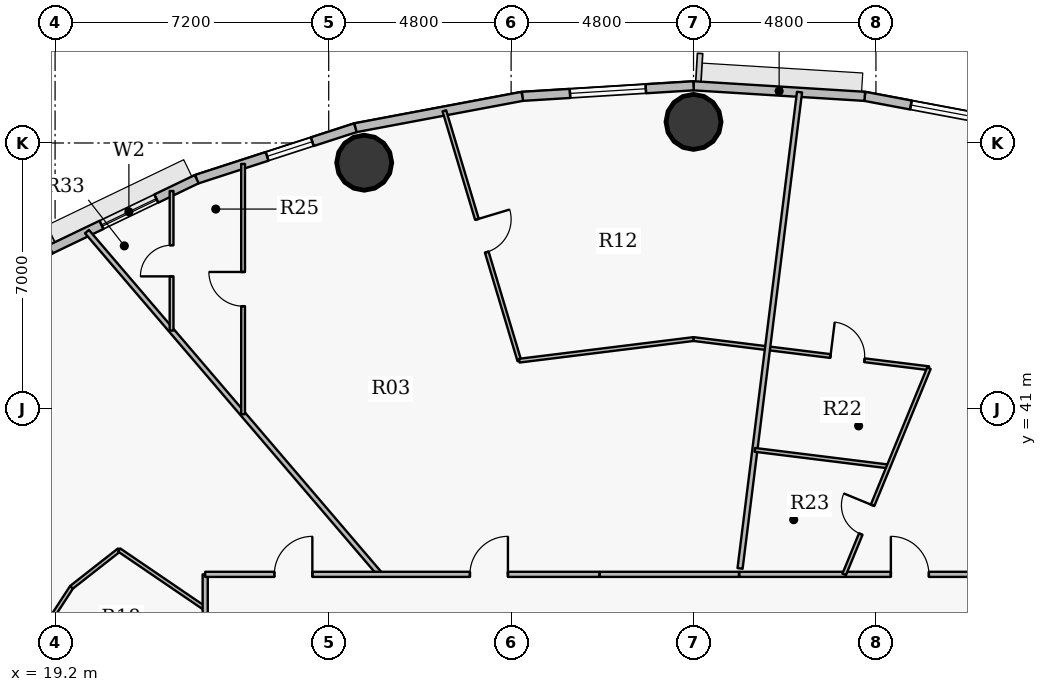
"""IFC4 building model, lengths in metres.
Left out: names, types, materials, properties, quantities, classifications, styles, units other than length and angle.
Written with IfcOpenShell. Run it as: python <this file> out.ifc"""

import sys

from ifc_helpers import new_model, si_unit, direction, frame, frame_2d, origin, origin_2d, place, context, subcontext, project, spatial, rectangle, hollow_circle, extrude, source, transform, mapped, element, fill, save


model = new_model("IFC4")
c1 = context("Model", 3, precision=1e-05, world=origin(), true_north=direction((0.0, 1.0)))
c2 = subcontext(c1, "Body", "Model", "MODEL_VIEW")
j1 = project(units=[si_unit("LENGTHUNIT", "METRE"), si_unit("PLANEANGLEUNIT", "RADIAN")], contexts=[c1])
p1 = place(None, origin())
s1 = spatial("IfcSite", under=j1, at=p1, CompositionType="ELEMENT")
p2 = place(p1, origin())
s2 = spatial("IfcBuilding", under=s1, at=p2, CompositionType="ELEMENT")
p3 = place(p2, frame((0.0, 0.0, 100.95)))
s3 = spatial("IfcBuildingStorey", under=s2, at=p3, CompositionType="ELEMENT", Elevation=100.95)
for number, where, z_axis, x_axis in (
    (1, (36.0, 48.555, 0.0), (0.0, 0.0, 1.0), (1.0, 0.0, 0.0)),
    (2, (27.334, 47.481, 0.0), (0.0, 0.0, 1.0), (1.0, 0.0, 0.0)),
):
    element("IfcColumn", number, at=place(p3, frame(where, z_axis=z_axis, x_axis=x_axis)), inside=s3, PredefinedType="COLUMN", context=c2, shape_type="SweptSolid", body=[
        extrude(hollow_circle(Radius=0.725, WallThickness=0.042, at=origin_2d()), origin(), (0.0, 0.0, 1.0), 3.75),
    ])
p4 = place(p3, frame((40.506, 49.227, 0.0), z_axis=(0.0, 0.0, 1.0), x_axis=(0.982789252177, -0.184730305596, 0.0)))
e3 = element("IfcWall", 3, at=p4, inside=s3, PredefinedType="SOLIDWALL", context=c2, shape_type="SweptSolid", body=[
    extrude(rectangle(XDim=4.471, YDim=0.24, at=frame_2d((2.235, 0.0))), origin(), (0.0, 0.0, 1.0), 3.5),
])
p5 = place(p4, frame((1.236, 0.0, 0.9)))
e4 = element("IfcOpeningElement", 4, at=p5, cuts=e3, PredefinedType="OPENING", context=c2, shape_type="SweptSolid", body=[
    extrude(rectangle(XDim=2.0, YDim=1.75, at=origin_2d()), frame((1.0, 0.13, 0.875), z_axis=(0.0, -1.0, 0.0), x_axis=(1.0, 0.0, 0.0)), (0.0, 0.0, 1.0), 0.26),
])
p6 = place(p3, frame((36.0, 49.505, 0.0), z_axis=(0.0, 0.0, 1.0), x_axis=(0.998107531589, -0.061492726276, 0.0)))
e5 = element("IfcWall", 5, at=p6, inside=s3, PredefinedType="SOLIDWALL", context=c2, shape_type="SweptSolid", body=[
    extrude(rectangle(XDim=4.514, YDim=0.24, at=frame_2d((2.257, 0.0))), origin(), (0.0, 0.0, 1.0), 3.5),
])
p7 = place(p3, frame((31.494, 49.227, 0.0), z_axis=(0.0, 0.0, 1.0), x_axis=(0.998107531589, 0.061492726276, 0.0)))
e6 = element("IfcWall", 6, at=p7, inside=s3, PredefinedType="SOLIDWALL", context=c2, shape_type="SweptSolid", body=[
    extrude(rectangle(XDim=4.514, YDim=0.24, at=frame_2d((2.257, 0.0))), origin(), (0.0, 0.0, 1.0), 3.5),
])
p8 = place(p7, frame((1.257, 0.0, 0.9)))
e7 = element("IfcOpeningElement", 7, at=p8, cuts=e6, PredefinedType="OPENING", context=c2, shape_type="SweptSolid", body=[
    extrude(rectangle(XDim=2.0, YDim=1.75, at=origin_2d()), frame((1.0, 0.13, 0.875), z_axis=(0.0, -1.0, 0.0), x_axis=(1.0, 0.0, 0.0)), (0.0, 0.0, 1.0), 0.26),
])
p9 = place(p3, frame((27.1, 48.401, 0.0), z_axis=(0.0, 0.0, 1.0), x_axis=(0.982789252177, 0.184730305596, 0.0)))
e8 = element("IfcWall", 8, at=p9, inside=s3, PredefinedType="SOLIDWALL", context=c2, shape_type="SweptSolid", body=[
    extrude(rectangle(XDim=4.471, YDim=0.24, at=frame_2d((2.235, 0.0))), origin(), (0.0, 0.0, 1.0), 3.5),
])
p10 = place(p3, frame((22.926, 47.047, 0.0), z_axis=(0.0, 0.0, 1.0), x_axis=(0.951211346073, 0.308540070495, 0.0)))
e9 = element("IfcWall", 9, at=p10, inside=s3, PredefinedType="SOLIDWALL", context=c2, shape_type="SweptSolid", body=[
    extrude(rectangle(XDim=4.388, YDim=0.24, at=frame_2d((2.194, 0.0))), origin(), (0.0, 0.0, 1.0), 3.5),
])
p11 = place(p10, frame((1.948, 0.0, 0.9)))
e10 = element("IfcOpeningElement", 10, at=p11, cuts=e9, PredefinedType="OPENING", context=c2, shape_type="SweptSolid", body=[
    extrude(rectangle(XDim=1.25, YDim=1.65, at=origin_2d()), frame((0.625, 0.13, 0.825), z_axis=(0.0, -1.0, 0.0), x_axis=(1.0, 0.0, 0.0)), (0.0, 0.0, 1.0), 0.26),
])
p12 = place(p3, frame((19.075, 45.199, 0.0), z_axis=(0.0, 0.0, 1.0), x_axis=(0.901589935876, 0.432591709962, 0.0)))
e11 = element("IfcWall", 11, at=p12, inside=s3, PredefinedType="SOLIDWALL", context=c2, shape_type="SweptSolid", body=[
    extrude(rectangle(XDim=4.272, YDim=0.24, at=frame_2d((2.136, 0.0))), origin(), (0.0, 0.0, 1.0), 3.5),
])
p13 = place(p12, frame((1.493, 0.0, 0.9)))
e12 = element("IfcOpeningElement", 12, at=p13, cuts=e11, PredefinedType="OPENING", context=c2, shape_type="SweptSolid", body=[
    extrude(rectangle(XDim=1.6, YDim=1.75, at=origin_2d()), frame((0.8, 0.13, 0.875), z_axis=(0.0, -1.0, 0.0), x_axis=(1.0, 0.0, 0.0)), (0.0, 0.0, 1.0), 0.26),
])
p14 = place(p3, frame((15.642, 42.903, 0.0), z_axis=(0.0, 0.0, 1.0), x_axis=(0.831221811447, 0.555940914284, 0.0)))
e13 = element("IfcWall", 13, at=p14, inside=s3, PredefinedType="SOLIDWALL", context=c2, shape_type="SweptSolid", body=[
    extrude(rectangle(XDim=4.13, YDim=0.24, at=frame_2d((2.065, 0.0))), origin(), (0.0, 0.0, 1.0), 3.5),
])
p15 = place(p14, frame((1.065, 0.0, 0.9)))
e14 = element("IfcOpeningElement", 14, at=p15, cuts=e13, PredefinedType="OPENING", context=c2, shape_type="SweptSolid", body=[
    extrude(rectangle(XDim=2.0, YDim=1.75, at=origin_2d()), frame((1.0, 0.13, 0.875), z_axis=(0.0, -1.0, 0.0), x_axis=(1.0, 0.0, 0.0)), (0.0, 0.0, 1.0), 0.26),
])
p16 = place(p3, frame((9.741, 36.057, 0.0), z_axis=(0.0, 0.0, 1.0), x_axis=(0.945349748634, -0.326058051207, 0.0)))
e15 = element("IfcWall", 15, at=p16, inside=s3, PredefinedType="PARTITIONING", context=c2, shape_type="SweptSolid", body=[
    extrude(rectangle(XDim=14.184, YDim=0.135, at=frame_2d((7.092, 0.0))), origin(), (0.0, 0.0, 1.0), 2.935),
])
p17 = place(p3, frame((16.76, 31.895, 0.0), z_axis=(0.0, 0.0, 1.0), x_axis=(0.545405249109, 0.838172484781, 0.0)))
e16 = element("IfcWall", 16, at=p17, inside=s3, PredefinedType="PARTITIONING", context=c2, shape_type="SweptSolid", body=[
    extrude(rectangle(XDim=5.269, YDim=0.1, at=frame_2d((2.634, 0.0))), origin(), (0.0, 0.0, 1.0), 2.935),
])
p18 = place(p17, frame((3.012, 0.0, 0.0)))
e17 = element("IfcOpeningElement", 17, at=p18, cuts=e16, PredefinedType="OPENING", context=c2, shape_type="SweptSolid", body=[
    extrude(rectangle(XDim=0.9, YDim=2.1, at=origin_2d()), frame((0.45, 0.06, 1.05), z_axis=(0.0, -1.0, 0.0), x_axis=(1.0, 0.0, 0.0)), (0.0, 0.0, 1.0), 0.12),
])
p19 = place(p3, frame((19.634, 36.311, 0.0), z_axis=(0.0, 0.0, 1.0), x_axis=(0.787313775385, 0.616552527437, 0.0)))
e18 = element("IfcWall", 18, at=p19, inside=s3, PredefinedType="PARTITIONING", context=c2, shape_type="SweptSolid", body=[
    extrude(rectangle(XDim=1.59, YDim=0.1, at=frame_2d((0.795, 0.0))), origin(), (0.0, 0.0, 1.0), 3.5),
])
p20 = place(p3, frame((20.04, 45.668, 0.0), z_axis=(0.0, 0.0, 1.0), x_axis=(0.649828321201, -0.760081017369, 0.0)))
e19 = element("IfcWall", 19, at=p20, inside=s3, PredefinedType="PARTITIONING", context=c2, shape_type="SweptSolid", body=[
    extrude(rectangle(XDim=11.865, YDim=0.135, at=frame_2d((5.932, 0.0))), origin(), (0.0, 0.0, 1.0), 2.935),
])
p21 = place(p3, frame((20.885, 37.291, 0.0), z_axis=(0.0, 0.0, 1.0), x_axis=(0.826581607155, -0.562816885596, 0.0)))
e20 = element("IfcWall", 20, at=p21, inside=s3, PredefinedType="PARTITIONING", context=c2, shape_type="SweptSolid", body=[
    extrude(rectangle(XDim=2.74, YDim=0.1, at=frame_2d((1.37, 0.0))), origin(), (0.0, 0.0, 1.0), 3.5),
])
p22 = place(p3, frame((22.265, 43.064, 0.0), z_axis=(0.0, 0.0, 1.0), x_axis=(0.0, 1.0, 0.0)))
e21 = element("IfcWall", 21, at=p22, inside=s3, PredefinedType="PARTITIONING", context=c2, shape_type="SweptSolid", body=[
    extrude(rectangle(XDim=3.671, YDim=0.1, at=frame_2d((1.836, 0.0))), origin(), (0.0, 0.0, 1.0), 2.935),
])
p23 = place(p22, frame((1.426, 0.0, 0.0)))
e22 = element("IfcOpeningElement", 22, at=p23, cuts=e21, PredefinedType="OPENING", context=c2, shape_type="SweptSolid", body=[
    extrude(rectangle(XDim=0.82, YDim=2.1, at=origin_2d()), frame((0.41, 0.06, 1.05), z_axis=(0.0, -1.0, 0.0), x_axis=(1.0, 0.0, 0.0)), (0.0, 0.0, 1.0), 0.12),
])
p24 = place(p3, frame((23.15, 17.35, 0.0), z_axis=(0.0, 0.0, 1.0), x_axis=(0.0, 1.0, 0.0)))
e23 = element("IfcWall", 23, at=p24, inside=s3, PredefinedType="PARTITIONING", context=c2, shape_type="SweptSolid", body=[
    extrude(rectangle(XDim=19.3, YDim=0.135, at=frame_2d((9.65, 0.0))), origin(), (0.0, 0.0, 1.0), 2.935),
])
p25 = place(p24, frame((7.86, 0.0, 0.0)))
e24 = element("IfcOpeningElement", 24, at=p25, cuts=e23, PredefinedType="OPENING", context=c2, shape_type="SweptSolid", body=[
    extrude(rectangle(XDim=1.0, YDim=2.15, at=origin_2d()), frame((0.5, 0.078, 1.075), z_axis=(0.0, -1.0, 0.0), x_axis=(1.0, 0.0, 0.0)), (0.0, 0.0, 1.0), 0.155),
])
p26 = place(p3, frame((23.15, 36.65, 0.0), z_axis=(0.0, 0.0, 1.0), x_axis=(1.0, 0.0, 0.0)))
e25 = element("IfcWall", 25, at=p26, inside=s3, PredefinedType="PARTITIONING", context=c2, shape_type="SweptSolid", body=[
    extrude(rectangle(XDim=10.373, YDim=0.135, at=frame_2d((5.187, 0.0))), origin(), (0.0, 0.0, 1.0), 2.935),
])
p27 = place(p26, frame((6.966, 0.0, 0.0)))
e26 = element("IfcOpeningElement", 26, at=p27, cuts=e25, PredefinedType="OPENING", context=c2, shape_type="SweptSolid", body=[
    extrude(rectangle(XDim=1.0, YDim=2.15, at=origin_2d()), frame((0.5, 0.078, 1.075), z_axis=(0.0, -1.0, 0.0), x_axis=(1.0, 0.0, 0.0)), (0.0, 0.0, 1.0), 0.155),
])
p28 = place(p26, frame((1.82, 0.0, 0.0)))
e27 = element("IfcOpeningElement", 27, at=p28, cuts=e25, PredefinedType="OPENING", context=c2, shape_type="SweptSolid", body=[
    extrude(rectangle(XDim=1.0, YDim=2.15, at=origin_2d()), frame((0.5, 0.078, 1.075), z_axis=(0.0, -1.0, 0.0), x_axis=(1.0, 0.0, 0.0)), (0.0, 0.0, 1.0), 0.155),
])
p29 = place(p3, frame((24.147, 40.864, 0.0), z_axis=(0.0, 0.0, 1.0), x_axis=(0.0, 1.0, 0.0)))
e28 = element("IfcWall", 28, at=p29, inside=s3, PredefinedType="PARTITIONING", context=c2, shape_type="SweptSolid", body=[
    extrude(rectangle(XDim=6.585, YDim=0.1, at=frame_2d((3.292, 0.0))), origin(), (0.0, 0.0, 1.0), 2.935),
])
p30 = place(p29, frame((2.843, 0.0, 0.0)))
e29 = element("IfcOpeningElement", 29, at=p30, cuts=e28, PredefinedType="OPENING", context=c2, shape_type="SweptSolid", body=[
    extrude(rectangle(XDim=0.9, YDim=2.1, at=origin_2d()), frame((0.45, 0.06, 1.05), z_axis=(0.0, -1.0, 0.0), x_axis=(1.0, 0.0, 0.0)), (0.0, 0.0, 1.0), 0.12),
])
p31 = place(p3, frame((29.443, 48.847, 0.0), z_axis=(0.0, 0.0, 1.0), x_axis=(0.287465357653, -0.957791035743, 0.0)))
e30 = element("IfcWall", 30, at=p31, inside=s3, PredefinedType="PARTITIONING", context=c2, shape_type="SweptSolid", body=[
    extrude(rectangle(XDim=6.864, YDim=0.1, at=frame_2d((3.432, 0.0))), origin(), (0.0, 0.0, 1.0), 2.935),
])
p32 = place(p31, frame((2.982, 0.0, 0.0)))
e31 = element("IfcOpeningElement", 31, at=p32, cuts=e30, PredefinedType="OPENING", context=c2, shape_type="SweptSolid", body=[
    extrude(rectangle(XDim=0.9, YDim=2.1, at=origin_2d()), frame((0.45, 0.06, 1.05), z_axis=(0.0, -1.0, 0.0), x_axis=(1.0, 0.0, 0.0)), (0.0, 0.0, 1.0), 0.12),
])
p33 = place(p3, frame((31.416, 42.272, 0.0), z_axis=(0.0, 0.0, 1.0), x_axis=(0.992393726446, 0.12310439355, 0.0)))
e32 = element("IfcWall", 32, at=p33, inside=s3, PredefinedType="PARTITIONING", context=c2, shape_type="SweptSolid", body=[
    extrude(rectangle(XDim=4.619, YDim=0.1, at=frame_2d((2.31, 0.0))), origin(), (0.0, 0.0, 1.0), 2.935),
])
p34 = place(p3, frame((36.0, 42.841, 0.0), z_axis=(0.0, 0.0, 1.0), x_axis=(0.992393593066, -0.123105468776, 0.0)))
e33 = element("IfcWall", 33, at=p34, inside=s3, PredefinedType="PARTITIONING", context=c2, shape_type="SweptSolid", body=[
    extrude(rectangle(XDim=6.241, YDim=0.1, at=frame_2d((3.121, 0.0))), origin(), (0.0, 0.0, 1.0), 2.935),
])
p35 = place(p34, frame((3.632, 0.0, 0.0)))
e34 = element("IfcOpeningElement", 34, at=p35, cuts=e33, PredefinedType="OPENING", context=c2, shape_type="SweptSolid", body=[
    extrude(rectangle(XDim=0.9, YDim=2.1, at=origin_2d()), frame((0.45, 0.06, 1.05), z_axis=(0.0, -1.0, 0.0), x_axis=(1.0, 0.0, 0.0)), (0.0, 0.0, 1.0), 0.12),
])
p36 = place(p3, frame((37.205, 36.65, 0.0), z_axis=(0.0, 0.0, 1.0), x_axis=(1.0, 0.0, 0.0)))
e35 = element("IfcWall", 35, at=p36, inside=s3, PredefinedType="PARTITIONING", context=c2, shape_type="SweptSolid", body=[
    extrude(rectangle(XDim=11.499, YDim=0.135, at=frame_2d((5.75, 0.0))), origin(), (0.0, 0.0, 1.0), 2.935),
])
p37 = place(p36, frame((3.988, 0.0, 0.0)))
e36 = element("IfcOpeningElement", 36, at=p37, cuts=e35, PredefinedType="OPENING", context=c2, shape_type="SweptSolid", body=[
    extrude(rectangle(XDim=1.0, YDim=2.15, at=origin_2d()), frame((0.5, 0.078, 1.075), z_axis=(0.0, -1.0, 0.0), x_axis=(1.0, 0.0, 0.0)), (0.0, 0.0, 1.0), 0.155),
])
p38 = place(p3, frame((37.224, 36.805, 0.0), z_axis=(0.0, 0.0, 1.0), x_axis=(0.123906262398, 0.992293927291, 0.0)))
e37 = element("IfcWall", 37, at=p38, inside=s3, PredefinedType="PARTITIONING", context=c2, shape_type="SweptSolid", body=[
    extrude(rectangle(XDim=12.63, YDim=0.135, at=frame_2d((6.315, 0.0))), origin(), (0.0, 0.0, 1.0), 2.935),
])
p39 = place(p3, frame((37.614, 39.925, 0.0), z_axis=(0.0, 0.0, 1.0), x_axis=(0.992397148182, -0.123076806427, 0.0)))
e38 = element("IfcWall", 38, at=p39, inside=s3, PredefinedType="PARTITIONING", context=c2, shape_type="SweptSolid", body=[
    extrude(rectangle(XDim=3.545, YDim=0.1, at=frame_2d((1.772, 0.0))), origin(), (0.0, 0.0, 1.0), 3.5),
])
p40 = place(p3, frame((39.965, 36.65, 0.0), z_axis=(0.0, 0.0, 1.0), x_axis=(0.380069011115, 0.924958132452, 0.0)))
e39 = element("IfcWall", 39, at=p40, inside=s3, PredefinedType="PARTITIONING", context=c2, shape_type="SweptSolid", body=[
    extrude(rectangle(XDim=5.863, YDim=0.1, at=frame_2d((2.931, 0.0))), origin(), (0.0, 0.0, 1.0), 3.5),
])
p41 = place(p40, frame((1.145, 0.0, 0.0)))
e40 = element("IfcOpeningElement", 40, at=p41, cuts=e39, PredefinedType="OPENING", context=c2, shape_type="SweptSolid", body=[
    extrude(rectangle(XDim=0.82, YDim=2.1, at=origin_2d()), frame((0.41, 0.06, 1.05), z_axis=(0.0, -1.0, 0.0), x_axis=(1.0, 0.0, 0.0)), (0.0, 0.0, 1.0), 0.12),
])
p42 = place(p3, frame((33.533, 36.65, 0.0), z_axis=(0.0, 0.0, 1.0), x_axis=(1.0, 0.0, 0.0)))
e41 = element("IfcWall", 41, at=p42, inside=s3, PredefinedType="PARTITIONING", context=c2, shape_type="SweptSolid", body=[
    extrude(rectangle(XDim=3.662, YDim=0.135, at=frame_2d((1.831, 0.0))), origin(), (0.0, 0.0, 1.0), 2.935),
])
m1 = source(origin(), c2, "Body", "SweptSolid", [
    extrude(rectangle(XDim=2.0, YDim=1.75, at=origin_2d()), frame((1.0, 0.03, 0.875), z_axis=(0.0, -1.0, 0.0), x_axis=(1.0, 0.0, 0.0)), (0.0, 0.0, 1.0), 0.06),
])
p43 = place(p5, origin())
e42 = element("IfcWindow", 42, at=p43, inside=s3, PartitioningType="DOUBLE_PANEL_VERTICAL", PredefinedType="WINDOW", context=c2, shape_type="MappedRepresentation", body=[
    mapped(m1, transform((0.0, 0.0, 0.0), x_axis=(1.0, 0.0, 0.0), y_axis=(0.0, 1.0, 0.0), z_axis=(0.0, 0.0, 1.0), scale=1.0)),
])
fill(e4, e42)
p44 = place(p8, origin())
e43 = element("IfcWindow", 43, at=p44, inside=s3, PartitioningType="DOUBLE_PANEL_VERTICAL", PredefinedType="WINDOW", context=c2, shape_type="MappedRepresentation", body=[
    mapped(m1, transform((0.0, 0.0, 0.0), x_axis=(1.0, 0.0, 0.0), y_axis=(0.0, 1.0, 0.0), z_axis=(0.0, 0.0, 1.0), scale=1.0)),
])
fill(e7, e43)
m2 = source(origin(), c2, "Body", "SweptSolid", [
    extrude(rectangle(XDim=1.6, YDim=1.75, at=origin_2d()), frame((0.8, 0.03, 0.875), z_axis=(0.0, -1.0, 0.0), x_axis=(1.0, 0.0, 0.0)), (0.0, 0.0, 1.0), 0.06),
])
p45 = place(p13, origin())
e44 = element("IfcWindow", 44, at=p45, inside=s3, PartitioningType="DOUBLE_PANEL_VERTICAL", PredefinedType="WINDOW", context=c2, shape_type="MappedRepresentation", body=[
    mapped(m2, transform((0.0, 0.0, 0.0), x_axis=(1.0, 0.0, 0.0), y_axis=(0.0, 1.0, 0.0), z_axis=(0.0, 0.0, 1.0), scale=1.0)),
])
fill(e12, e44)
m3 = source(origin(), c2, "Body", "SweptSolid", [
    extrude(rectangle(XDim=1.25, YDim=1.65, at=origin_2d()), frame((0.625, 0.03, 0.825), z_axis=(0.0, -1.0, 0.0), x_axis=(1.0, 0.0, 0.0)), (0.0, 0.0, 1.0), 0.06),
])
p46 = place(p11, origin())
e45 = element("IfcWindow", 45, at=p46, inside=s3, PartitioningType="SINGLE_PANEL", PredefinedType="WINDOW", context=c2, shape_type="MappedRepresentation", body=[
    mapped(m3, transform((0.0, 0.0, 0.0), x_axis=(1.0, 0.0, 0.0), y_axis=(0.0, 1.0, 0.0), z_axis=(0.0, 0.0, 1.0), scale=1.0)),
])
fill(e10, e45)
m4 = source(origin(), c2, "Body", "SweptSolid", [
    extrude(rectangle(XDim=1.0, YDim=2.15, at=origin_2d()), frame((0.5, 0.025, 1.075), z_axis=(0.0, -1.0, 0.0), x_axis=(1.0, 0.0, 0.0)), (0.0, 0.0, 1.0), 0.05),
])
p47 = place(p37, origin())
e46 = element("IfcDoor", 46, at=p47, inside=s3, OperationType="SINGLE_SWING_LEFT", PredefinedType="DOOR", context=c2, shape_type="MappedRepresentation", body=[
    mapped(m4, transform((0.0, 0.0, 0.0), x_axis=(1.0, 0.0, 0.0), y_axis=(0.0, 1.0, 0.0), z_axis=(0.0, 0.0, 1.0), scale=1.0)),
])
fill(e36, e46)
m5 = source(origin(), c2, "Body", "SweptSolid", [
    extrude(rectangle(XDim=0.82, YDim=2.1, at=origin_2d()), frame((0.41, 0.025, 1.05), z_axis=(0.0, -1.0, 0.0), x_axis=(1.0, 0.0, 0.0)), (0.0, 0.0, 1.0), 0.05),
])
p48 = place(p41, origin())
e47 = element("IfcDoor", 47, at=p48, inside=s3, OperationType="SINGLE_SWING_RIGHT", PredefinedType="DOOR", context=c2, shape_type="MappedRepresentation", body=[
    mapped(m5, transform((0.0, 0.0, 0.0), x_axis=(1.0, 0.0, 0.0), y_axis=(0.0, 1.0, 0.0), z_axis=(0.0, 0.0, 1.0), scale=1.0)),
])
fill(e40, e47)
m6 = source(origin(), c2, "Body", "SweptSolid", [
    extrude(rectangle(XDim=0.9, YDim=2.1, at=origin_2d()), frame((0.45, 0.025, 1.05), z_axis=(0.0, -1.0, 0.0), x_axis=(1.0, 0.0, 0.0)), (0.0, 0.0, 1.0), 0.05),
])
p49 = place(p35, origin())
e48 = element("IfcDoor", 48, at=p49, inside=s3, OperationType="SINGLE_SWING_LEFT", PredefinedType="DOOR", context=c2, shape_type="MappedRepresentation", body=[
    mapped(m6, transform((0.0, 0.0, 0.0), x_axis=(1.0, 0.0, 0.0), y_axis=(0.0, 1.0, 0.0), z_axis=(0.0, 0.0, 1.0), scale=1.0)),
])
fill(e34, e48)
p50 = place(p27, origin())
e49 = element("IfcDoor", 49, at=p50, inside=s3, OperationType="SINGLE_SWING_RIGHT", PredefinedType="DOOR", context=c2, shape_type="MappedRepresentation", body=[
    mapped(m4, transform((0.0, 0.0, 0.0), x_axis=(1.0, 0.0, 0.0), y_axis=(0.0, 1.0, 0.0), z_axis=(0.0, 0.0, 1.0), scale=1.0)),
])
fill(e26, e49)
p51 = place(p32, origin())
e50 = element("IfcDoor", 50, at=p51, inside=s3, OperationType="SINGLE_SWING_LEFT", PredefinedType="DOOR", context=c2, shape_type="MappedRepresentation", body=[
    mapped(m6, transform((0.0, 0.0, 0.0), x_axis=(1.0, 0.0, 0.0), y_axis=(0.0, 1.0, 0.0), z_axis=(0.0, 0.0, 1.0), scale=1.0)),
])
fill(e31, e50)
p52 = place(p30, origin())
e51 = element("IfcDoor", 51, at=p52, inside=s3, OperationType="SINGLE_SWING_RIGHT", PredefinedType="DOOR", context=c2, shape_type="MappedRepresentation", body=[
    mapped(m6, transform((0.0, 0.0, 0.0), x_axis=(1.0, 0.0, 0.0), y_axis=(0.0, 1.0, 0.0), z_axis=(0.0, 0.0, 1.0), scale=1.0)),
])
fill(e29, e51)
p53 = place(p23, origin())
e52 = element("IfcDoor", 52, at=p53, inside=s3, OperationType="SINGLE_SWING_LEFT", PredefinedType="DOOR", context=c2, shape_type="MappedRepresentation", body=[
    mapped(m5, transform((0.0, 0.0, 0.0), x_axis=(1.0, 0.0, 0.0), y_axis=(0.0, 1.0, 0.0), z_axis=(0.0, 0.0, 1.0), scale=1.0)),
])
fill(e22, e52)
p54 = place(p28, origin())
e53 = element("IfcDoor", 53, at=p54, inside=s3, OperationType="SINGLE_SWING_RIGHT", PredefinedType="DOOR", context=c2, shape_type="MappedRepresentation", body=[
    mapped(m4, transform((0.0, 0.0, 0.0), x_axis=(1.0, 0.0, 0.0), y_axis=(0.0, 1.0, 0.0), z_axis=(0.0, 0.0, 1.0), scale=1.0)),
])
fill(e27, e53)
save(model, sys.argv[1])
